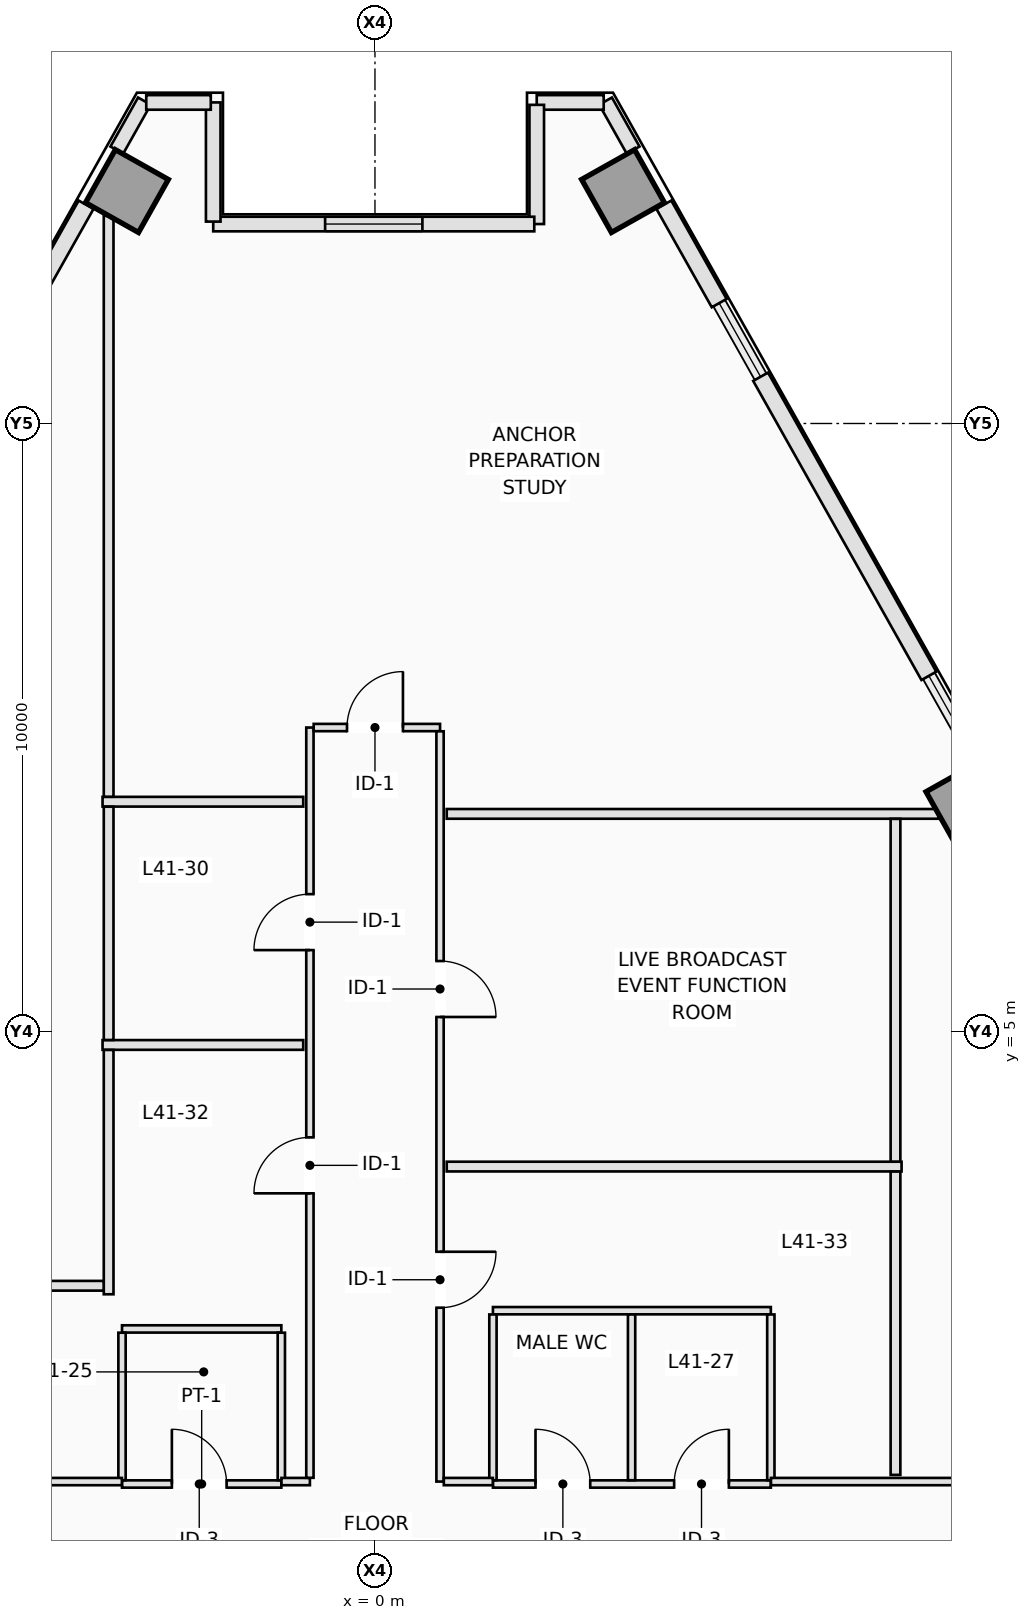
"""IFC4 building model, lengths in metres.
Left out: names, types, materials, properties, quantities, classifications, styles, units other than length and angle.
Written with IfcOpenShell. Run it as: python <this file> out.ifc"""

import sys

from ifc_helpers import new_model, si_unit, direction, frame, frame_2d, origin, origin_2d, place, context, subcontext, project, spatial, rectangle, extrude, element, fill, save


model = new_model("IFC4")
c1 = context("Model", 3, precision=1e-05, world=origin(), true_north=direction((0.0, 1.0)))
c2 = subcontext(c1, "Body", "Model", "MODEL_VIEW")
j1 = project(units=[si_unit("LENGTHUNIT", "METRE"), si_unit("PLANEANGLEUNIT", "RADIAN")], contexts=[c1])
p1 = place(None, origin())
s1 = spatial("IfcSite", under=j1, at=p1, CompositionType="ELEMENT")
p2 = place(p1, origin())
s2 = spatial("IfcBuilding", under=s1, at=p2, CompositionType="ELEMENT")
p3 = place(p2, frame((0.0, 0.0, 151.0)))
s3 = spatial("IfcBuildingStorey", under=s2, at=p3, CompositionType="ELEMENT", Elevation=151.0)
for number, where, z_axis, x_axis in (
    (1, (9.743, 8.753, 0.0), (0.0, 0.0, 1.0), (0.872, 0.49, 0.0)),
    (2, (4.079, 18.822, 0.0), (0.0, 0.0, 1.0), (0.872, 0.49, 0.0)),
    (3, (-4.079, 18.822, 0.0), (0.0, 0.0, 1.0), (-0.872, 0.49, 0.0)),
):
    element("IfcColumn", number, at=place(p3, frame(where, z_axis=z_axis, x_axis=x_axis)), inside=s3, PredefinedType="COLUMN", context=c2, shape_type="SweptSolid", body=[
        extrude(rectangle(XDim=1.0, YDim=1.0, at=origin_2d()), origin(), (0.0, 0.0, 1.0), 3.5),
    ])
p4 = place(p3, frame((3.792, 20.302, 0.0), z_axis=(0.0, 0.0, 1.0), x_axis=(0.490048346303, -0.871695255399, 0.0)))
e4 = element("IfcWall", 4, at=p4, inside=s3, PredefinedType="STANDARD", context=c2, shape_type="SweptSolid", body=[
    extrude(rectangle(XDim=0.926, YDim=0.24, at=frame_2d((0.463, 0.0))), origin(), (0.0, 0.0, 1.0), 3.25),
])
p5 = place(p3, frame((4.751, 18.597, 0.0), z_axis=(0.0, 0.0, 1.0), x_axis=(0.490248749158, -0.871582562899, 0.0)))
e5 = element("IfcWall", 5, at=p5, inside=s3, PredefinedType="STANDARD", context=c2, shape_type="SweptSolid", body=[
    extrude(rectangle(XDim=1.856, YDim=0.28, at=frame_2d((0.928, 0.0))), origin(), (0.0, 0.0, 1.0), 3.25),
])
p6 = place(p3, frame((6.342, 15.768, 0.0), z_axis=(0.0, 0.0, 1.0), x_axis=(0.490289995219, -0.871559361483, 0.0)))
e6 = element("IfcWall", 6, at=p6, inside=s3, PredefinedType="STANDARD", context=c2, shape_type="SweptSolid", body=[
    extrude(rectangle(XDim=5.643, YDim=0.28, at=frame_2d((2.822, 0.0))), origin(), (0.0, 0.0, 1.0), 3.25),
])
p7 = place(p3, frame((-4.246, 19.495, 0.0), z_axis=(0.0, 0.0, 1.0), x_axis=(0.490048346303, 0.871695255399, 0.0)))
e7 = element("IfcWall", 7, at=p7, inside=s3, PredefinedType="STANDARD", context=c2, shape_type="SweptSolid", body=[
    extrude(rectangle(XDim=0.926, YDim=0.24, at=frame_2d((0.463, 0.0))), origin(), (0.0, 0.0, 1.0), 3.25),
])
p8 = place(p3, frame((-5.661, 16.98, 0.0), z_axis=(0.0, 0.0, 1.0), x_axis=(0.490248749158, 0.871582562899, 0.0)))
e8 = element("IfcWall", 8, at=p8, inside=s3, PredefinedType="STANDARD", context=c2, shape_type="SweptSolid", body=[
    extrude(rectangle(XDim=1.856, YDim=0.28, at=frame_2d((0.928, 0.0))), origin(), (0.0, 0.0, 1.0), 3.25),
])
p9 = place(p3, frame((3.761, 20.28, 0.0), z_axis=(0.0, 0.0, 1.0), x_axis=(-1.0, 0.0, 0.0)))
e9 = element("IfcWall", 9, at=p9, inside=s3, PredefinedType="STANDARD", context=c2, shape_type="SweptSolid", body=[
    extrude(rectangle(XDim=1.102, YDim=0.24, at=frame_2d((0.551, 0.0))), origin(), (0.0, 0.0, 1.0), 3.25),
])
p10 = place(p3, frame((2.66, 20.24, 0.0), z_axis=(0.0, 0.0, 1.0), x_axis=(0.0, -1.0, 0.0)))
e10 = element("IfcWall", 10, at=p10, inside=s3, PredefinedType="STANDARD", context=c2, shape_type="SweptSolid", body=[
    extrude(rectangle(XDim=1.96, YDim=0.24, at=frame_2d((0.98, 0.0))), origin(), (0.0, 0.0, 1.0), 3.25),
])
p11 = place(p3, frame((2.62, 18.28, 0.0), z_axis=(0.0, 0.0, 1.0), x_axis=(-1.0, 0.0, 0.0)))
e11 = element("IfcWall", 11, at=p11, inside=s3, PredefinedType="STANDARD", context=c2, shape_type="SweptSolid", body=[
    extrude(rectangle(XDim=5.28, YDim=0.24, at=frame_2d((2.64, 0.0))), origin(), (0.0, 0.0, 1.0), 3.25),
])
p12 = place(p11, frame((1.84, 0.0, 0.9)))
e12 = element("IfcOpeningElement", 12, at=p12, cuts=e11, PredefinedType="OPENING", context=c2, shape_type="SweptSolid", body=[
    extrude(rectangle(XDim=1.6, YDim=2.1, at=frame_2d((0.8, 1.05))), frame((0.0, 0.13, 0.0), z_axis=(0.0, -1.0, 0.0), x_axis=(1.0, 0.0, 0.0)), (0.0, 0.0, 1.0), 0.26),
])
p13 = place(p3, frame((-2.66, 18.32, 0.0), z_axis=(0.0, 0.0, 1.0), x_axis=(0.0, 1.0, 0.0)))
e13 = element("IfcWall", 13, at=p13, inside=s3, PredefinedType="STANDARD", context=c2, shape_type="SweptSolid", body=[
    extrude(rectangle(XDim=1.96, YDim=0.24, at=frame_2d((0.98, 0.0))), origin(), (0.0, 0.0, 1.0), 3.25),
])
p14 = place(p3, frame((-2.7, 20.28, 0.0), z_axis=(0.0, 0.0, 1.0), x_axis=(-1.0, 0.0, 0.0)))
e14 = element("IfcWall", 14, at=p14, inside=s3, PredefinedType="STANDARD", context=c2, shape_type="SweptSolid", body=[
    extrude(rectangle(XDim=1.062, YDim=0.24, at=frame_2d((0.531, 0.0))), origin(), (0.0, 0.0, 1.0), 3.25),
])
p15 = place(p3, frame((-4.16, -2.44, 0.0), z_axis=(0.0, 0.0, 1.0), x_axis=(1.0, 0.0, 0.0)))
e15 = element("IfcWall", 15, at=p15, inside=s3, PredefinedType="PARTITIONING", context=c2, shape_type="SweptSolid", body=[
    extrude(rectangle(XDim=2.62, YDim=0.12, at=frame_2d((1.31, 0.0))), origin(), (0.0, 0.0, 1.0), 2.891),
])
p16 = place(p15, frame((0.82, 0.0, 0.0)))
e16 = element("IfcOpeningElement", 16, at=p16, cuts=e15, PredefinedType="OPENING", context=c2, shape_type="SweptSolid", body=[
    extrude(rectangle(XDim=0.9, YDim=2.12, at=frame_2d((0.45, 1.06))), frame((0.0, 0.07, 0.0), z_axis=(0.0, -1.0, 0.0), x_axis=(1.0, 0.0, 0.0)), (0.0, 0.0, 1.0), 0.14),
])
p17 = place(p3, frame((-4.16, 0.11, 0.0), z_axis=(0.0, 0.0, 1.0), x_axis=(1.0, 0.0, 0.0)))
e17 = element("IfcWall", 17, at=p17, inside=s3, PredefinedType="PARTITIONING", context=c2, shape_type="SweptSolid", body=[
    extrude(rectangle(XDim=2.62, YDim=0.12, at=frame_2d((1.31, 0.0))), origin(), (0.0, 0.0, 1.0), 3.25),
])
for number, where, z_axis, x_axis in (
    (18, (-4.16, -2.378, 0.0), (0.0, 0.0, 1.0), (0.0, 1.0, 0.0)),
    (19, (-1.54, -2.378, 0.0), (0.0, 0.0, 1.0), (0.0, 1.0, 0.0)),
):
    element("IfcWall", number, at=place(p3, frame(where, z_axis=z_axis, x_axis=x_axis)), inside=s3, PredefinedType="PARTITIONING", context=c2, shape_type="SweptSolid", body=[
        extrude(rectangle(XDim=2.426, YDim=0.12, at=frame_2d((1.213, 0.0))), origin(), (0.0, 0.0, 1.0), 3.25),
    ])
p18 = place(p3, frame((1.94, -2.44, 0.0), z_axis=(0.0, 0.0, 1.0), x_axis=(1.0, 0.0, 0.0)))
e20 = element("IfcWall", 20, at=p18, inside=s3, PredefinedType="PARTITIONING", context=c2, shape_type="SweptSolid", body=[
    extrude(rectangle(XDim=4.57, YDim=0.12, at=frame_2d((2.285, 0.0))), origin(), (0.0, 0.0, 1.0), 2.891),
])
p19 = place(p18, frame((0.7, 0.0, 0.0)))
e21 = element("IfcOpeningElement", 21, at=p19, cuts=e20, PredefinedType="OPENING", context=c2, shape_type="SweptSolid", body=[
    extrude(rectangle(XDim=0.9, YDim=2.12, at=frame_2d((0.45, 1.06))), frame((0.0, 0.07, 0.0), z_axis=(0.0, -1.0, 0.0), x_axis=(1.0, 0.0, 0.0)), (0.0, 0.0, 1.0), 0.14),
])
p20 = place(p18, frame((2.98, 0.0, 0.0)))
e22 = element("IfcOpeningElement", 22, at=p20, cuts=e20, PredefinedType="OPENING", context=c2, shape_type="SweptSolid", body=[
    extrude(rectangle(XDim=0.9, YDim=2.12, at=frame_2d((0.45, 1.06))), frame((0.0, 0.07, 0.0), z_axis=(0.0, -1.0, 0.0), x_axis=(1.0, 0.0, 0.0)), (0.0, 0.0, 1.0), 0.14),
])
p21 = place(p3, frame((1.94, 0.41, 0.0), z_axis=(0.0, 0.0, 1.0), x_axis=(1.0, 0.0, 0.0)))
e23 = element("IfcWall", 23, at=p21, inside=s3, PredefinedType="PARTITIONING", context=c2, shape_type="SweptSolid", body=[
    extrude(rectangle(XDim=4.57, YDim=0.12, at=frame_2d((2.285, 0.0))), origin(), (0.0, 0.0, 1.0), 3.25),
])
for number, where, z_axis, x_axis in (
    (24, (1.94, -2.378, 0.0), (0.0, 0.0, 1.0), (0.0, 1.0, 0.0)),
    (25, (4.22, -2.378, 0.0), (0.0, 0.0, 1.0), (0.0, 1.0, 0.0)),
    (26, (6.51, -2.378, 0.0), (0.0, 0.0, 1.0), (0.0, 1.0, 0.0)),
):
    element("IfcWall", number, at=place(p3, frame(where, z_axis=z_axis, x_axis=x_axis)), inside=s3, PredefinedType="PARTITIONING", context=c2, shape_type="SweptSolid", body=[
        extrude(rectangle(XDim=2.726, YDim=0.12, at=frame_2d((1.363, 0.0))), origin(), (0.0, 0.0, 1.0), 3.25),
    ])
p22 = place(p3, frame((-12.348, -2.4, 0.0), z_axis=(0.0, 0.0, 1.0), x_axis=(1.0, 0.0, 0.0)))
e27 = element("IfcWall", 27, at=p22, inside=s3, PredefinedType="PARTITIONING", context=c2, shape_type="SweptSolid", body=[
    extrude(rectangle(XDim=8.186, YDim=0.12, at=frame_2d((4.093, 0.0))), origin(), (0.0, 0.0, 1.0), 2.891),
])
p23 = place(p22, frame((4.378, 0.0, 0.0)))
e28 = element("IfcOpeningElement", 28, at=p23, cuts=e27, PredefinedType="OPENING", context=c2, shape_type="SweptSolid", body=[
    extrude(rectangle(XDim=0.92, YDim=2.12, at=frame_2d((0.46, 1.06))), frame((0.0, 0.07, 0.0), z_axis=(0.0, -1.0, 0.0), x_axis=(1.0, 0.0, 0.0)), (0.0, 0.0, 1.0), 0.14),
])
p24 = place(p3, frame((-1.538, -2.4, 0.0), z_axis=(0.0, 0.0, 1.0), x_axis=(1.0, 0.0, 0.0)))
e29 = element("IfcWall", 29, at=p24, inside=s3, PredefinedType="PARTITIONING", context=c2, shape_type="SweptSolid", body=[
    extrude(rectangle(XDim=0.468, YDim=0.12, at=frame_2d((0.234, 0.0))), origin(), (0.0, 0.0, 1.0), 2.891),
])
p25 = place(p3, frame((-1.07, -2.338, 0.0), z_axis=(0.0, 0.0, 1.0), x_axis=(0.0, 1.0, 0.0)))
e30 = element("IfcWall", 30, at=p25, inside=s3, PredefinedType="PARTITIONING", context=c2, shape_type="SweptSolid", body=[
    extrude(rectangle(XDim=12.338, YDim=0.12, at=frame_2d((6.169, 0.0))), origin(), (0.0, 0.0, 1.0), 3.25),
])
p26 = place(p25, frame((8.678, 0.0, 0.0)))
e31 = element("IfcOpeningElement", 31, at=p26, cuts=e30, PredefinedType="OPENING", context=c2, shape_type="SweptSolid", body=[
    extrude(rectangle(XDim=0.92, YDim=2.12, at=frame_2d((0.46, 1.06))), frame((0.0, 0.07, 0.0), z_axis=(0.0, -1.0, 0.0), x_axis=(1.0, 0.0, 0.0)), (0.0, 0.0, 1.0), 0.14),
])
p27 = place(p25, frame((4.678, 0.0, 0.0)))
e32 = element("IfcOpeningElement", 32, at=p27, cuts=e30, PredefinedType="OPENING", context=c2, shape_type="SweptSolid", body=[
    extrude(rectangle(XDim=0.92, YDim=2.12, at=frame_2d((0.46, 1.06))), frame((0.0, 0.07, 0.0), z_axis=(0.0, -1.0, 0.0), x_axis=(1.0, 0.0, 0.0)), (0.0, 0.0, 1.0), 0.14),
])
p28 = place(p3, frame((-1.008, 10.0, 0.0), z_axis=(0.0, 0.0, 1.0), x_axis=(1.0, 0.0, 0.0)))
e33 = element("IfcWall", 33, at=p28, inside=s3, PredefinedType="PARTITIONING", context=c2, shape_type="SweptSolid", body=[
    extrude(rectangle(XDim=2.078, YDim=0.12, at=frame_2d((1.039, 0.0))), origin(), (0.0, 0.0, 1.0), 3.25),
])
p29 = place(p28, frame((0.548, 0.0, 0.0)))
e34 = element("IfcOpeningElement", 34, at=p29, cuts=e33, PredefinedType="OPENING", context=c2, shape_type="SweptSolid", body=[
    extrude(rectangle(XDim=0.92, YDim=2.12, at=frame_2d((0.46, 1.06))), frame((0.0, 0.07, 0.0), z_axis=(0.0, -1.0, 0.0), x_axis=(1.0, 0.0, 0.0)), (0.0, 0.0, 1.0), 0.14),
])
p30 = place(p3, frame((1.07, 9.938, 0.0), z_axis=(0.0, 0.0, 1.0), x_axis=(0.0, -1.0, 0.0)))
e35 = element("IfcWall", 35, at=p30, inside=s3, PredefinedType="PARTITIONING", context=c2, shape_type="SweptSolid", body=[
    extrude(rectangle(XDim=12.338, YDim=0.12, at=frame_2d((6.169, 0.0))), origin(), (0.0, 0.0, 1.0), 3.25),
])
p31 = place(p30, frame((3.778, 0.0, 0.0)))
e36 = element("IfcOpeningElement", 36, at=p31, cuts=e35, PredefinedType="OPENING", context=c2, shape_type="SweptSolid", body=[
    extrude(rectangle(XDim=0.92, YDim=2.12, at=frame_2d((0.46, 1.06))), frame((0.0, 0.07, 0.0), z_axis=(0.0, -1.0, 0.0), x_axis=(1.0, 0.0, 0.0)), (0.0, 0.0, 1.0), 0.14),
])
p32 = place(p30, frame((8.559, 0.0, 0.0)))
e37 = element("IfcOpeningElement", 37, at=p32, cuts=e35, PredefinedType="OPENING", context=c2, shape_type="SweptSolid", body=[
    extrude(rectangle(XDim=0.92, YDim=2.12, at=frame_2d((0.46, 1.06))), frame((0.0, 0.07, 0.0), z_axis=(0.0, -1.0, 0.0), x_axis=(1.0, 0.0, 0.0)), (0.0, 0.0, 1.0), 0.14),
])
p33 = place(p3, frame((1.132, -2.4, 0.0), z_axis=(0.0, 0.0, 1.0), x_axis=(1.0, 0.0, 0.0)))
e38 = element("IfcWall", 38, at=p33, inside=s3, PredefinedType="PARTITIONING", context=c2, shape_type="SweptSolid", body=[
    extrude(rectangle(XDim=0.806, YDim=0.12, at=frame_2d((0.403, 0.0))), origin(), (0.0, 0.0, 1.0), 2.891),
])
p34 = place(p3, frame((6.512, -2.4, 0.0), z_axis=(0.0, 0.0, 1.0), x_axis=(1.0, 0.0, 0.0)))
e39 = element("IfcWall", 39, at=p34, inside=s3, PredefinedType="PARTITIONING", context=c2, shape_type="SweptSolid", body=[
    extrude(rectangle(XDim=5.898, YDim=0.12, at=frame_2d((2.949, 0.0))), origin(), (0.0, 0.0, 1.0), 3.25),
])
p35 = place(p34, frame((3.384, 0.0, 0.0)))
e40 = element("IfcOpeningElement", 40, at=p35, cuts=e39, PredefinedType="OPENING", context=c2, shape_type="SweptSolid", body=[
    extrude(rectangle(XDim=0.92, YDim=2.12, at=frame_2d((0.46, 1.06))), frame((0.0, 0.07, 0.0), z_axis=(0.0, -1.0, 0.0), x_axis=(1.0, 0.0, 0.0)), (0.0, 0.0, 1.0), 0.14),
])
p36 = place(p3, frame((-1.18, 8.78, 0.0), z_axis=(0.0, 0.0, 1.0), x_axis=(-1.0, 0.0, 0.0)))
e41 = element("IfcWall", 41, at=p36, inside=s3, PredefinedType="PARTITIONING", context=c2, shape_type="SweptSolid", body=[
    extrude(rectangle(XDim=3.3, YDim=0.16, at=frame_2d((1.65, 0.0))), origin(), (0.0, 0.0, 1.0), 3.25),
])
p37 = place(p3, frame((9.264, 8.58, 0.0), z_axis=(0.0, 0.0, 1.0), x_axis=(-1.0, 0.0, 0.0)))
e42 = element("IfcWall", 42, at=p37, inside=s3, PredefinedType="PARTITIONING", context=c2, shape_type="SweptSolid", body=[
    extrude(rectangle(XDim=8.084, YDim=0.16, at=frame_2d((4.042, 0.0))), origin(), (0.0, 0.0, 1.0), 3.25),
])
p38 = place(p3, frame((-4.38, 8.862, 0.0), z_axis=(0.0, 0.0, 1.0), x_axis=(0.0, 1.0, 0.0)))
e43 = element("IfcWall", 43, at=p38, inside=s3, PredefinedType="PARTITIONING", context=c2, shape_type="SweptSolid", body=[
    extrude(rectangle(XDim=9.553, YDim=0.16, at=frame_2d((4.777, 0.0))), origin(), (0.0, 0.0, 1.0), 3.25),
])
p39 = place(p3, frame((-1.18, 4.78, 0.0), z_axis=(0.0, 0.0, 1.0), x_axis=(-1.0, 0.0, 0.0)))
e44 = element("IfcWall", 44, at=p39, inside=s3, PredefinedType="PARTITIONING", context=c2, shape_type="SweptSolid", body=[
    extrude(rectangle(XDim=3.3, YDim=0.16, at=frame_2d((1.65, 0.0))), origin(), (0.0, 0.0, 1.0), 3.25),
])
p40 = place(p3, frame((-4.38, 4.862, 0.0), z_axis=(0.0, 0.0, 1.0), x_axis=(0.0, 1.0, 0.0)))
e45 = element("IfcWall", 45, at=p40, inside=s3, PredefinedType="PARTITIONING", context=c2, shape_type="SweptSolid", body=[
    extrude(rectangle(XDim=3.836, YDim=0.16, at=frame_2d((1.918, 0.0))), origin(), (0.0, 0.0, 1.0), 3.25),
])
p41 = place(p3, frame((8.66, 2.78, 0.0), z_axis=(0.0, 0.0, 1.0), x_axis=(-1.0, 0.0, 0.0)))
e46 = element("IfcWall", 46, at=p41, inside=s3, PredefinedType="PARTITIONING", context=c2, shape_type="SweptSolid", body=[
    extrude(rectangle(XDim=7.48, YDim=0.16, at=frame_2d((3.74, 0.0))), origin(), (0.0, 0.0, 1.0), 3.25),
])
p42 = place(p3, frame((8.56, 8.498, 0.0), z_axis=(0.0, 0.0, 1.0), x_axis=(0.0, -1.0, 0.0)))
e47 = element("IfcWall", 47, at=p42, inside=s3, PredefinedType="PARTITIONING", context=c2, shape_type="SweptSolid", body=[
    extrude(rectangle(XDim=5.636, YDim=0.16, at=frame_2d((2.818, 0.0))), origin(), (0.0, 0.0, 1.0), 3.25),
])
p43 = place(p3, frame((-4.38, 0.68, 0.0), z_axis=(0.0, 0.0, 1.0), x_axis=(0.0, 1.0, 0.0)))
e48 = element("IfcWall", 48, at=p43, inside=s3, PredefinedType="PARTITIONING", context=c2, shape_type="SweptSolid", body=[
    extrude(rectangle(XDim=4.018, YDim=0.16, at=frame_2d((2.009, 0.0))), origin(), (0.0, 0.0, 1.0), 3.25),
])
p44 = place(p3, frame((8.56, 2.698, 0.0), z_axis=(0.0, 0.0, 1.0), x_axis=(0.0, -1.0, 0.0)))
e49 = element("IfcWall", 49, at=p44, inside=s3, PredefinedType="PARTITIONING", context=c2, shape_type="SweptSolid", body=[
    extrude(rectangle(XDim=4.988, YDim=0.16, at=frame_2d((2.494, 0.0))), origin(), (0.0, 0.0, 1.0), 3.25),
])
p45 = place(p3, frame((-10.598, 0.82, 0.0), z_axis=(0.0, 0.0, 1.0), x_axis=(1.0, 0.0, 0.0)))
e50 = element("IfcWall", 50, at=p45, inside=s3, PredefinedType="PARTITIONING", context=c2, shape_type="SweptSolid", body=[
    extrude(rectangle(XDim=6.136, YDim=0.16, at=frame_2d((3.068, 0.0))), origin(), (0.0, 0.0, 1.0), 3.25),
])
p46 = place(p12, origin())
e51 = element("IfcWindow", 51, at=p46, inside=s3, PartitioningType="SINGLE_PANEL", PredefinedType="WINDOW", context=c2, shape_type="SweptSolid", body=[
    extrude(rectangle(XDim=1.6, YDim=2.1, at=frame_2d((0.8, 1.05))), frame((0.0, 0.03, 0.0), z_axis=(0.0, -1.0, 0.0), x_axis=(1.0, 0.0, 0.0)), (0.0, 0.0, 1.0), 0.06),
])
fill(e12, e51)
p47 = place(p16, origin())
e52 = element("IfcDoor", 52, at=p47, inside=s3, OperationType="SINGLE_SWING_LEFT", PredefinedType="DOOR", context=c2, shape_type="SweptSolid", body=[
    extrude(rectangle(XDim=0.9, YDim=2.12, at=frame_2d((0.45, 1.06))), frame((0.0, 0.025, 0.0), z_axis=(0.0, -1.0, 0.0), x_axis=(1.0, 0.0, 0.0)), (0.0, 0.0, 1.0), 0.05),
])
fill(e16, e52)
p48 = place(p19, origin())
e53 = element("IfcDoor", 53, at=p48, inside=s3, OperationType="SINGLE_SWING_LEFT", PredefinedType="DOOR", context=c2, shape_type="SweptSolid", body=[
    extrude(rectangle(XDim=0.9, YDim=2.12, at=frame_2d((0.45, 1.06))), frame((0.0, 0.025, 0.0), z_axis=(0.0, -1.0, 0.0), x_axis=(1.0, 0.0, 0.0)), (0.0, 0.0, 1.0), 0.05),
])
fill(e21, e53)
p49 = place(p20, origin())
e54 = element("IfcDoor", 54, at=p49, inside=s3, OperationType="SINGLE_SWING_RIGHT", PredefinedType="DOOR", context=c2, shape_type="SweptSolid", body=[
    extrude(rectangle(XDim=0.9, YDim=2.12, at=frame_2d((0.45, 1.06))), frame((0.0, 0.025, 0.0), z_axis=(0.0, -1.0, 0.0), x_axis=(1.0, 0.0, 0.0)), (0.0, 0.0, 1.0), 0.05),
])
fill(e22, e54)
p50 = place(p29, origin())
e55 = element("IfcDoor", 55, at=p50, inside=s3, OperationType="SINGLE_SWING_RIGHT", PredefinedType="DOOR", context=c2, shape_type="SweptSolid", body=[
    extrude(rectangle(XDim=0.92, YDim=2.12, at=frame_2d((0.46, 1.06))), frame((0.0, 0.025, 0.0), z_axis=(0.0, -1.0, 0.0), x_axis=(1.0, 0.0, 0.0)), (0.0, 0.0, 1.0), 0.05),
])
fill(e34, e55)
p51 = place(p26, origin())
e56 = element("IfcDoor", 56, at=p51, inside=s3, OperationType="SINGLE_SWING_LEFT", PredefinedType="DOOR", context=c2, shape_type="SweptSolid", body=[
    extrude(rectangle(XDim=0.92, YDim=2.12, at=frame_2d((0.46, 1.06))), frame((0.0, 0.025, 0.0), z_axis=(0.0, -1.0, 0.0), x_axis=(1.0, 0.0, 0.0)), (0.0, 0.0, 1.0), 0.05),
])
fill(e31, e56)
p52 = place(p31, origin())
e57 = element("IfcDoor", 57, at=p52, inside=s3, OperationType="SINGLE_SWING_RIGHT", PredefinedType="DOOR", context=c2, shape_type="SweptSolid", body=[
    extrude(rectangle(XDim=0.92, YDim=2.12, at=frame_2d((0.46, 1.06))), frame((0.0, 0.025, 0.0), z_axis=(0.0, -1.0, 0.0), x_axis=(1.0, 0.0, 0.0)), (0.0, 0.0, 1.0), 0.05),
])
fill(e36, e57)
p53 = place(p27, origin())
e58 = element("IfcDoor", 58, at=p53, inside=s3, OperationType="SINGLE_SWING_LEFT", PredefinedType="DOOR", context=c2, shape_type="SweptSolid", body=[
    extrude(rectangle(XDim=0.92, YDim=2.12, at=frame_2d((0.46, 1.06))), frame((0.0, 0.025, 0.0), z_axis=(0.0, -1.0, 0.0), x_axis=(1.0, 0.0, 0.0)), (0.0, 0.0, 1.0), 0.05),
])
fill(e32, e58)
p54 = place(p32, origin())
e59 = element("IfcDoor", 59, at=p54, inside=s3, OperationType="SINGLE_SWING_LEFT", PredefinedType="DOOR", context=c2, shape_type="SweptSolid", body=[
    extrude(rectangle(XDim=0.92, YDim=2.12, at=frame_2d((0.46, 1.06))), frame((0.0, 0.025, 0.0), z_axis=(0.0, -1.0, 0.0), x_axis=(1.0, 0.0, 0.0)), (0.0, 0.0, 1.0), 0.05),
])
fill(e37, e59)
save(model, sys.argv[1])
